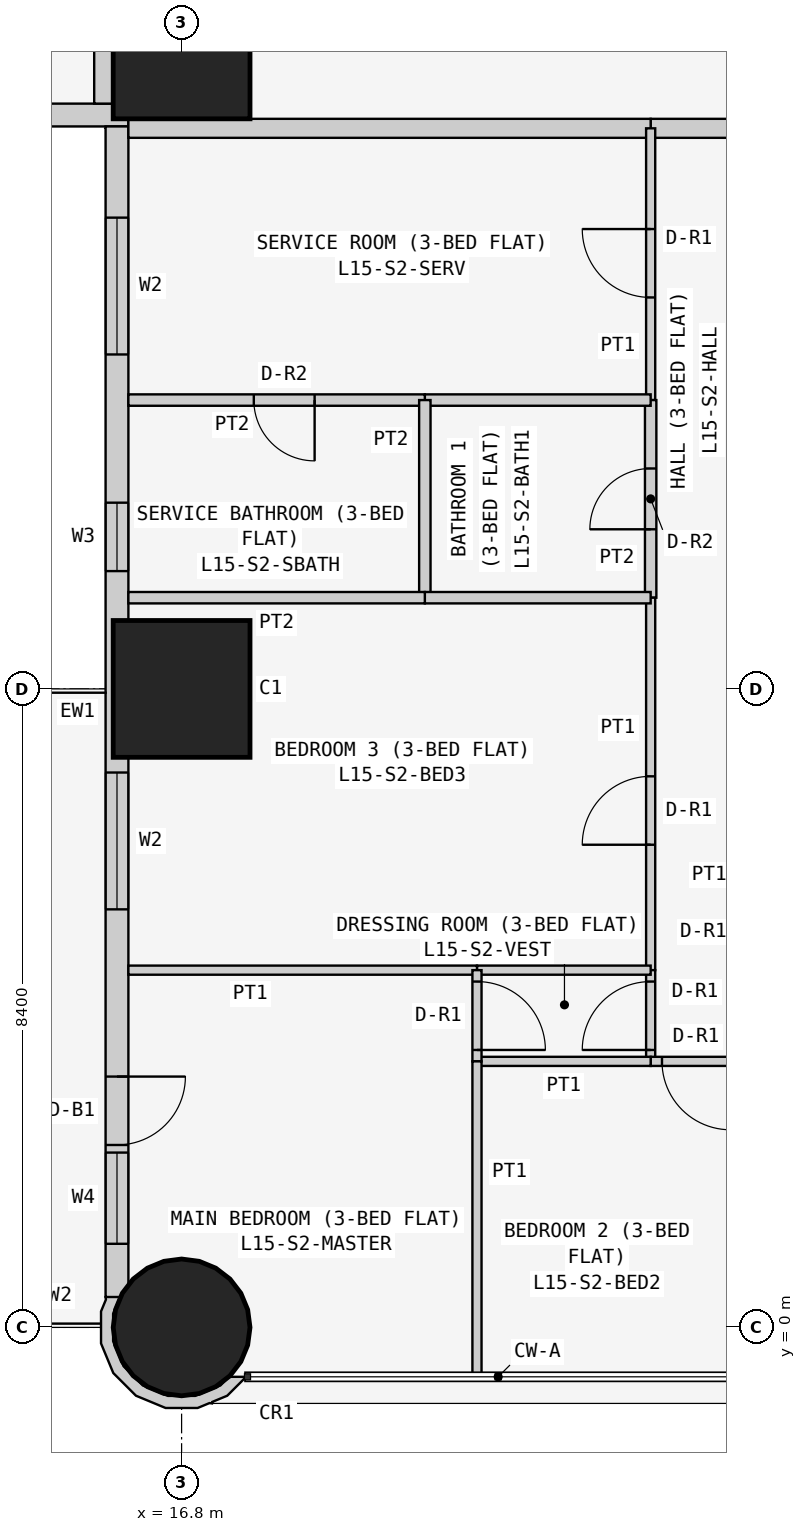
"""IFC4 building model, lengths in metres.
Left out: names, types, materials, properties, quantities, classifications, styles, units other than length and angle.
Written with IfcOpenShell. Run it as: python <this file> out.ifc"""

import sys

from ifc_helpers import new_model, si_unit, direction, frame, frame_2d, origin, origin_2d, place, context, subcontext, project, spatial, polyline, rectangle, circle, outline, extrude, element, fill, save


model = new_model("IFC4")
c1 = context("Model", 3, precision=1e-05, world=origin(), true_north=direction((0.0, 1.0)))
c2 = subcontext(c1, "Body", "Model", "MODEL_VIEW")
j1 = project(units=[si_unit("LENGTHUNIT", "METRE"), si_unit("PLANEANGLEUNIT", "RADIAN")], contexts=[c1])
p1 = place(None, origin())
s1 = spatial("IfcSite", under=j1, at=p1, CompositionType="ELEMENT")
p2 = place(p1, origin())
s2 = spatial("IfcBuilding", under=s1, at=p2, CompositionType="ELEMENT")
p3 = place(p2, frame((0.0, 0.0, 63.3)))
s3 = spatial("IfcBuildingStorey", under=s2, at=p3, CompositionType="ELEMENT", Elevation=63.3)
p4 = place(p3, frame((16.8, 0.0, 0.0), z_axis=(0.0, 0.0, 1.0), x_axis=(1.0, 0.0, 0.0)))
e1 = element("IfcColumn", 1, at=p4, inside=s3, PredefinedType="COLUMN", context=c2, shape_type="SweptSolid", body=[
    extrude(circle(Radius=0.9, at=origin_2d()), origin(), (0.0, 0.0, 1.0), 3.6),
])
for number, where, z_axis, x_axis in (
    (2, (16.8, 8.4, 0.0), (0.0, 0.0, 1.0), (1.0, 0.0, 0.0)),
    (3, (16.8, 16.8, 0.0), (0.0, 0.0, 1.0), (1.0, 0.0, 0.0)),
):
    element("IfcColumn", number, at=place(p3, frame(where, z_axis=z_axis, x_axis=x_axis)), inside=s3, PredefinedType="COLUMN", context=c2, shape_type="SweptSolid", body=[
        extrude(rectangle(XDim=1.8, YDim=1.8, at=origin_2d()), origin(), (0.0, 0.0, 1.0), 3.6),
    ])
p5 = place(p3, frame((0.4, 15.95, 0.0), z_axis=(0.0, 0.0, 1.0), x_axis=(1.0, 0.0, 0.0)))
e4 = element("IfcWall", 4, at=p5, inside=s3, PredefinedType="SOLIDWALL", context=c2, shape_type="SweptSolid", body=[
    extrude(rectangle(XDim=15.7, YDim=0.3, at=frame_2d((7.85, 0.0))), origin(), (0.0, 0.0, 1.0), 3.45),
])
p6 = place(p5, frame((12.4, 0.0, 0.9)))
e5 = element("IfcOpeningElement", 5, at=p6, cuts=e4, PredefinedType="OPENING", context=c2, shape_type="SweptSolid", body=[
    extrude(rectangle(XDim=1.8, YDim=1.5, at=frame_2d((0.9, 0.75))), frame((0.0, 0.16, 0.0), z_axis=(0.0, -1.0, 0.0), x_axis=(1.0, 0.0, 0.0)), (0.0, 0.0, 1.0), 0.32),
])
p7 = place(p5, frame((9.55, 0.0, 1.5)))
e6 = element("IfcOpeningElement", 6, at=p7, cuts=e4, PredefinedType="OPENING", context=c2, shape_type="SweptSolid", body=[
    extrude(rectangle(XDim=0.9, YDim=0.7, at=frame_2d((0.45, 0.35))), frame((0.0, 0.16, 0.0), z_axis=(0.0, -1.0, 0.0), x_axis=(1.0, 0.0, 0.0)), (0.0, 0.0, 1.0), 0.32),
])
p8 = place(p5, frame((5.1, 0.0, 0.9)))
e7 = element("IfcOpeningElement", 7, at=p8, cuts=e4, PredefinedType="OPENING", context=c2, shape_type="SweptSolid", body=[
    extrude(rectangle(XDim=1.8, YDim=1.5, at=frame_2d((0.9, 0.75))), frame((0.0, 0.16, 0.0), z_axis=(0.0, -1.0, 0.0), x_axis=(1.0, 0.0, 0.0)), (0.0, 0.0, 1.0), 0.32),
])
p9 = place(p5, frame((2.0, 0.0, 0.0)))
e8 = element("IfcOpeningElement", 8, at=p9, cuts=e4, PredefinedType="OPENING", context=c2, shape_type="SweptSolid", body=[
    extrude(rectangle(XDim=0.9, YDim=2.4, at=frame_2d((0.45, 1.2))), frame((0.0, 0.16, 0.0), z_axis=(0.0, -1.0, 0.0), x_axis=(1.0, 0.0, 0.0)), (0.0, 0.0, 1.0), 0.32),
])
p10 = place(p5, frame((0.7, 0.0, 0.9)))
e9 = element("IfcOpeningElement", 9, at=p10, cuts=e4, PredefinedType="OPENING", context=c2, shape_type="SweptSolid", body=[
    extrude(rectangle(XDim=1.2, YDim=1.5, at=frame_2d((0.6, 0.75))), frame((0.0, 0.16, 0.0), z_axis=(0.0, -1.0, 0.0), x_axis=(1.0, 0.0, 0.0)), (0.0, 0.0, 1.0), 0.32),
])
p11 = place(p3, frame((15.95, 15.8, 0.0), z_axis=(0.0, 0.0, 1.0), x_axis=(0.0, -1.0, 0.0)))
e10 = element("IfcWall", 10, at=p11, inside=s3, PredefinedType="SOLIDWALL", context=c2, shape_type="SweptSolid", body=[
    extrude(rectangle(XDim=15.4, YDim=0.3, at=frame_2d((7.7, 0.0))), origin(), (0.0, 0.0, 1.0), 3.45),
])
p12 = place(p11, frame((1.2, 0.0, 0.9)))
e11 = element("IfcOpeningElement", 11, at=p12, cuts=e10, PredefinedType="OPENING", context=c2, shape_type="SweptSolid", body=[
    extrude(rectangle(XDim=1.8, YDim=1.5, at=frame_2d((0.9, 0.75))), frame((0.0, 0.16, 0.0), z_axis=(0.0, -1.0, 0.0), x_axis=(1.0, 0.0, 0.0)), (0.0, 0.0, 1.0), 0.32),
])
p13 = place(p11, frame((4.95, 0.0, 1.5)))
e12 = element("IfcOpeningElement", 12, at=p13, cuts=e10, PredefinedType="OPENING", context=c2, shape_type="SweptSolid", body=[
    extrude(rectangle(XDim=0.9, YDim=0.7, at=frame_2d((0.45, 0.35))), frame((0.0, 0.16, 0.0), z_axis=(0.0, -1.0, 0.0), x_axis=(1.0, 0.0, 0.0)), (0.0, 0.0, 1.0), 0.32),
])
p14 = place(p11, frame((8.5, 0.0, 0.9)))
e13 = element("IfcOpeningElement", 13, at=p14, cuts=e10, PredefinedType="OPENING", context=c2, shape_type="SweptSolid", body=[
    extrude(rectangle(XDim=1.8, YDim=1.5, at=frame_2d((0.9, 0.75))), frame((0.0, 0.16, 0.0), z_axis=(0.0, -1.0, 0.0), x_axis=(1.0, 0.0, 0.0)), (0.0, 0.0, 1.0), 0.32),
])
p15 = place(p11, frame((12.5, 0.0, 0.0)))
e14 = element("IfcOpeningElement", 14, at=p15, cuts=e10, PredefinedType="OPENING", context=c2, shape_type="SweptSolid", body=[
    extrude(rectangle(XDim=0.9, YDim=2.4, at=frame_2d((0.45, 1.2))), frame((0.0, 0.16, 0.0), z_axis=(0.0, -1.0, 0.0), x_axis=(1.0, 0.0, 0.0)), (0.0, 0.0, 1.0), 0.32),
])
p16 = place(p11, frame((13.5, 0.0, 0.9)))
e15 = element("IfcOpeningElement", 15, at=p16, cuts=e10, PredefinedType="OPENING", context=c2, shape_type="SweptSolid", body=[
    extrude(rectangle(XDim=1.2, YDim=1.5, at=frame_2d((0.6, 0.75))), frame((0.0, 0.16, 0.0), z_axis=(0.0, -1.0, 0.0), x_axis=(1.0, 0.0, 0.0)), (0.0, 0.0, 1.0), 0.32),
])
p17 = place(p3, frame((15.89, 0.364, 0.0), z_axis=(0.0, 0.0, 1.0), x_axis=(-0.377204953059, -0.926129809145, 0.0)))
e16 = element("IfcWall", 16, at=p17, inside=s3, PredefinedType="SOLIDWALL", context=c2, shape_type="SweptSolid", body=[
    extrude(outline(polyline([(0.36, 1.803), (0.509, 1.741), (0.761, 1.486), (0.896, 1.154), (0.894, 0.795), (0.755, 0.465), (0.5, 0.213), (0.168, 0.078), (-0.1, 0.08), (0.001, -0.097), (0.03, -0.08), (0.199, -0.081), (0.589, 0.078), (0.889, 0.374), (1.053, 0.763), (1.055, 1.185), (0.896, 1.575), (0.778, 1.695), (0.769, 1.728), (0.75, 1.723), (0.6, 1.875), (0.295, 2.004), (0.281, 1.998), (0.36, 1.803)])), origin(), (0.0, 0.0, 1.0), 3.45),
])
p18 = place(p3, frame((24.171, 15.775, 0.0), z_axis=(0.0, 0.0, 1.0), x_axis=(-1.0, 0.0, 0.0)))
e17 = element("IfcWall", 17, at=p18, inside=s3, PredefinedType="PARTITIONING", context=c2, shape_type="SweptSolid", body=[
    extrude(rectangle(XDim=1.2, YDim=0.25, at=frame_2d((0.6, 0.0))), origin(), (0.0, 0.0, 1.0), 3.45),
])
p19 = place(p3, frame((22.971, 15.775, 0.0), z_axis=(0.0, 0.0, 1.0), x_axis=(-1.0, 0.0, 0.0)))
e18 = element("IfcWall", 18, at=p19, inside=s3, PredefinedType="PARTITIONING", context=c2, shape_type="SweptSolid", body=[
    extrude(rectangle(XDim=6.871, YDim=0.25, at=frame_2d((3.436, 0.0))), origin(), (0.0, 0.0, 1.0), 3.45),
])
p20 = place(p3, frame((15.775, 16.1, 0.0), z_axis=(0.0, 0.0, 1.0), x_axis=(0.0, 1.0, 0.0)))
e19 = element("IfcWall", 19, at=p20, inside=s3, PredefinedType="PARTITIONING", context=c2, shape_type="SweptSolid", body=[
    extrude(rectangle(XDim=6.471, YDim=0.25, at=frame_2d((3.235, 0.0))), origin(), (0.0, 0.0, 1.0), 3.45),
])
p21 = place(p3, frame((22.971, 12.2, 0.0), z_axis=(0.0, 0.0, 1.0), x_axis=(0.0, 1.0, 0.0)))
e20 = element("IfcWall", 20, at=p21, inside=s3, PredefinedType="PARTITIONING", context=c2, shape_type="SweptSolid", body=[
    extrude(rectangle(XDim=3.575, YDim=0.12, at=frame_2d((1.788, 0.0))), origin(), (0.0, 0.0, 1.0), 3.45),
])
p22 = place(p21, frame((1.35, 0.0, 0.0)))
e21 = element("IfcOpeningElement", 21, at=p22, cuts=e20, PredefinedType="OPENING", context=c2, shape_type="SweptSolid", body=[
    extrude(rectangle(XDim=0.9, YDim=2.1, at=frame_2d((0.45, 1.05))), frame((0.0, 0.07, 0.0), z_axis=(0.0, -1.0, 0.0), x_axis=(1.0, 0.0, 0.0)), (0.0, 0.0, 1.0), 0.14),
])
p23 = place(p3, frame((22.971, 9.6, 0.0), z_axis=(0.0, 0.0, 1.0), x_axis=(0.0, 1.0, 0.0)))
e22 = element("IfcWall", 22, at=p23, inside=s3, PredefinedType="PARTITIONING", context=c2, shape_type="SweptSolid", body=[
    extrude(rectangle(XDim=2.6, YDim=0.15, at=frame_2d((1.3, 0.0))), origin(), (0.0, 0.0, 1.0), 3.45),
])
p24 = place(p23, frame((0.9, 0.0, 0.0)))
e23 = element("IfcOpeningElement", 23, at=p24, cuts=e22, PredefinedType="OPENING", context=c2, shape_type="SweptSolid", body=[
    extrude(rectangle(XDim=0.8, YDim=2.1, at=frame_2d((0.4, 1.05))), frame((0.0, 0.085, 0.0), z_axis=(0.0, -1.0, 0.0), x_axis=(1.0, 0.0, 0.0)), (0.0, 0.0, 1.0), 0.17),
])
p25 = place(p3, frame((22.971, 4.7, 0.0), z_axis=(0.0, 0.0, 1.0), x_axis=(0.0, 1.0, 0.0)))
e24 = element("IfcWall", 24, at=p25, inside=s3, PredefinedType="PARTITIONING", context=c2, shape_type="SweptSolid", body=[
    extrude(rectangle(XDim=4.9, YDim=0.12, at=frame_2d((2.45, 0.0))), origin(), (0.0, 0.0, 1.0), 3.45),
])
p26 = place(p25, frame((1.65, 0.0, 0.0)))
e25 = element("IfcOpeningElement", 25, at=p26, cuts=e24, PredefinedType="OPENING", context=c2, shape_type="SweptSolid", body=[
    extrude(rectangle(XDim=0.9, YDim=2.1, at=frame_2d((0.45, 1.05))), frame((0.0, 0.07, 0.0), z_axis=(0.0, -1.0, 0.0), x_axis=(1.0, 0.0, 0.0)), (0.0, 0.0, 1.0), 0.14),
])
p27 = place(p3, frame((22.971, 3.5, 0.0), z_axis=(0.0, 0.0, 1.0), x_axis=(0.0, 1.0, 0.0)))
e26 = element("IfcWall", 26, at=p27, inside=s3, PredefinedType="PARTITIONING", context=c2, shape_type="SweptSolid", body=[
    extrude(rectangle(XDim=1.2, YDim=0.12, at=frame_2d((0.6, 0.0))), origin(), (0.0, 0.0, 1.0), 3.45),
])
p28 = place(p27, frame((0.15, 0.0, 0.0)))
e27 = element("IfcOpeningElement", 27, at=p28, cuts=e26, PredefinedType="OPENING", context=c2, shape_type="SweptSolid", body=[
    extrude(rectangle(XDim=0.9, YDim=2.1, at=frame_2d((0.45, 1.05))), frame((0.0, 0.07, 0.0), z_axis=(0.0, -1.0, 0.0), x_axis=(1.0, 0.0, 0.0)), (0.0, 0.0, 1.0), 0.14),
])
p29 = place(p3, frame((24.171, 3.5, 0.0), z_axis=(0.0, 0.0, 1.0), x_axis=(-1.0, 0.0, 0.0)))
e28 = element("IfcWall", 28, at=p29, inside=s3, PredefinedType="PARTITIONING", context=c2, shape_type="SweptSolid", body=[
    extrude(rectangle(XDim=1.2, YDim=0.12, at=frame_2d((0.6, 0.0))), origin(), (0.0, 0.0, 1.0), 3.45),
])
p30 = place(p29, frame((0.151, 0.0, 0.0)))
e29 = element("IfcOpeningElement", 29, at=p30, cuts=e28, PredefinedType="OPENING", context=c2, shape_type="SweptSolid", body=[
    extrude(rectangle(XDim=0.9, YDim=2.1, at=frame_2d((0.45, 1.05))), frame((0.0, 0.07, 0.0), z_axis=(0.0, -1.0, 0.0), x_axis=(1.0, 0.0, 0.0)), (0.0, 0.0, 1.0), 0.14),
])
p31 = place(p3, frame((22.971, 12.2, 0.0), z_axis=(0.0, 0.0, 1.0), x_axis=(-1.0, 0.0, 0.0)))
e30 = element("IfcWall", 30, at=p31, inside=s3, PredefinedType="PARTITIONING", context=c2, shape_type="SweptSolid", body=[
    extrude(rectangle(XDim=2.971, YDim=0.15, at=frame_2d((1.485, 0.0))), origin(), (0.0, 0.0, 1.0), 3.45),
])
p32 = place(p3, frame((20.0, 12.2, 0.0), z_axis=(0.0, 0.0, 1.0), x_axis=(-1.0, 0.0, 0.0)))
e31 = element("IfcWall", 31, at=p32, inside=s3, PredefinedType="PARTITIONING", context=c2, shape_type="SweptSolid", body=[
    extrude(rectangle(XDim=3.9, YDim=0.15, at=frame_2d((1.95, 0.0))), origin(), (0.0, 0.0, 1.0), 3.45),
])
p33 = place(p32, frame((1.45, 0.0, 0.0)))
e32 = element("IfcOpeningElement", 32, at=p33, cuts=e31, PredefinedType="OPENING", context=c2, shape_type="SweptSolid", body=[
    extrude(rectangle(XDim=0.8, YDim=2.1, at=frame_2d((0.4, 1.05))), frame((0.0, 0.085, 0.0), z_axis=(0.0, -1.0, 0.0), x_axis=(1.0, 0.0, 0.0)), (0.0, 0.0, 1.0), 0.17),
])
p34 = place(p3, frame((20.0, 9.6, 0.0), z_axis=(0.0, 0.0, 1.0), x_axis=(0.0, 1.0, 0.0)))
e33 = element("IfcWall", 33, at=p34, inside=s3, PredefinedType="PARTITIONING", context=c2, shape_type="SweptSolid", body=[
    extrude(rectangle(XDim=2.6, YDim=0.15, at=frame_2d((1.3, 0.0))), origin(), (0.0, 0.0, 1.0), 3.45),
])
p35 = place(p3, frame((22.971, 9.6, 0.0), z_axis=(0.0, 0.0, 1.0), x_axis=(-1.0, 0.0, 0.0)))
e34 = element("IfcWall", 34, at=p35, inside=s3, PredefinedType="PARTITIONING", context=c2, shape_type="SweptSolid", body=[
    extrude(rectangle(XDim=2.971, YDim=0.15, at=frame_2d((1.485, 0.0))), origin(), (0.0, 0.0, 1.0), 3.45),
])
p36 = place(p3, frame((20.0, 9.6, 0.0), z_axis=(0.0, 0.0, 1.0), x_axis=(-1.0, 0.0, 0.0)))
e35 = element("IfcWall", 35, at=p36, inside=s3, PredefinedType="PARTITIONING", context=c2, shape_type="SweptSolid", body=[
    extrude(rectangle(XDim=3.9, YDim=0.15, at=frame_2d((1.95, 0.0))), origin(), (0.0, 0.0, 1.0), 3.45),
])
p37 = place(p3, frame((22.971, 4.7, 0.0), z_axis=(0.0, 0.0, 1.0), x_axis=(-1.0, 0.0, 0.0)))
e36 = element("IfcWall", 36, at=p37, inside=s3, PredefinedType="PARTITIONING", context=c2, shape_type="SweptSolid", body=[
    extrude(rectangle(XDim=2.285, YDim=0.12, at=frame_2d((1.143, 0.0))), origin(), (0.0, 0.0, 1.0), 3.45),
])
p38 = place(p3, frame((20.686, 4.7, 0.0), z_axis=(0.0, 0.0, 1.0), x_axis=(-1.0, 0.0, 0.0)))
e37 = element("IfcWall", 37, at=p38, inside=s3, PredefinedType="PARTITIONING", context=c2, shape_type="SweptSolid", body=[
    extrude(rectangle(XDim=4.586, YDim=0.12, at=frame_2d((2.293, 0.0))), origin(), (0.0, 0.0, 1.0), 3.45),
])
p39 = place(p3, frame((22.971, 3.5, 0.0), z_axis=(0.0, 0.0, 1.0), x_axis=(-1.0, 0.0, 0.0)))
e38 = element("IfcWall", 38, at=p39, inside=s3, PredefinedType="PARTITIONING", context=c2, shape_type="SweptSolid", body=[
    extrude(rectangle(XDim=2.285, YDim=0.12, at=frame_2d((1.143, 0.0))), origin(), (0.0, 0.0, 1.0), 3.45),
])
p40 = place(p3, frame((20.686, 3.5, 0.0), z_axis=(0.0, 0.0, 1.0), x_axis=(0.0, 1.0, 0.0)))
e39 = element("IfcWall", 39, at=p40, inside=s3, PredefinedType="PARTITIONING", context=c2, shape_type="SweptSolid", body=[
    extrude(rectangle(XDim=1.2, YDim=0.12, at=frame_2d((0.6, 0.0))), origin(), (0.0, 0.0, 1.0), 3.45),
])
p41 = place(p40, frame((0.15, 0.0, 0.0)))
e40 = element("IfcOpeningElement", 40, at=p41, cuts=e39, PredefinedType="OPENING", context=c2, shape_type="SweptSolid", body=[
    extrude(rectangle(XDim=0.9, YDim=2.1, at=frame_2d((0.45, 1.05))), frame((0.0, 0.07, 0.0), z_axis=(0.0, -1.0, 0.0), x_axis=(1.0, 0.0, 0.0)), (0.0, 0.0, 1.0), 0.14),
])
p42 = place(p3, frame((20.686, -0.65, 0.0), z_axis=(0.0, 0.0, 1.0), x_axis=(0.0, 1.0, 0.0)))
e41 = element("IfcWall", 41, at=p42, inside=s3, PredefinedType="PARTITIONING", context=c2, shape_type="SweptSolid", body=[
    extrude(rectangle(XDim=4.15, YDim=0.12, at=frame_2d((2.075, 0.0))), origin(), (0.0, 0.0, 1.0), 3.45),
])
p43 = place(p12, origin())
e42 = element("IfcWindow", 42, at=p43, inside=s3, PartitioningType="SINGLE_PANEL", PredefinedType="WINDOW", context=c2, shape_type="SweptSolid", body=[
    extrude(rectangle(XDim=1.8, YDim=1.5, at=frame_2d((0.9, 0.75))), frame((0.0, 0.03, 0.0), z_axis=(0.0, -1.0, 0.0), x_axis=(1.0, 0.0, 0.0)), (0.0, 0.0, 1.0), 0.06),
])
fill(e11, e42)
p44 = place(p13, origin())
e43 = element("IfcWindow", 43, at=p44, inside=s3, PartitioningType="SINGLE_PANEL", PredefinedType="WINDOW", context=c2, shape_type="SweptSolid", body=[
    extrude(rectangle(XDim=0.9, YDim=0.7, at=frame_2d((0.45, 0.35))), frame((0.0, 0.03, 0.0), z_axis=(0.0, -1.0, 0.0), x_axis=(1.0, 0.0, 0.0)), (0.0, 0.0, 1.0), 0.06),
])
fill(e12, e43)
p45 = place(p14, origin())
e44 = element("IfcWindow", 44, at=p45, inside=s3, PartitioningType="SINGLE_PANEL", PredefinedType="WINDOW", context=c2, shape_type="SweptSolid", body=[
    extrude(rectangle(XDim=1.8, YDim=1.5, at=frame_2d((0.9, 0.75))), frame((0.0, 0.03, 0.0), z_axis=(0.0, -1.0, 0.0), x_axis=(1.0, 0.0, 0.0)), (0.0, 0.0, 1.0), 0.06),
])
fill(e13, e44)
p46 = place(p15, origin())
e45 = element("IfcDoor", 45, at=p46, inside=s3, OperationType="SINGLE_SWING_LEFT", PredefinedType="DOOR", context=c2, shape_type="SweptSolid", body=[
    extrude(rectangle(XDim=0.9, YDim=2.4, at=frame_2d((0.45, 1.2))), frame((0.0, 0.025, 0.0), z_axis=(0.0, -1.0, 0.0), x_axis=(1.0, 0.0, 0.0)), (0.0, 0.0, 1.0), 0.05),
])
fill(e14, e45)
p47 = place(p16, origin())
e46 = element("IfcWindow", 46, at=p47, inside=s3, PartitioningType="SINGLE_PANEL", PredefinedType="WINDOW", context=c2, shape_type="SweptSolid", body=[
    extrude(rectangle(XDim=1.2, YDim=1.5, at=frame_2d((0.6, 0.75))), frame((0.0, 0.03, 0.0), z_axis=(0.0, -1.0, 0.0), x_axis=(1.0, 0.0, 0.0)), (0.0, 0.0, 1.0), 0.06),
])
fill(e15, e46)
p48 = place(p22, origin())
e47 = element("IfcDoor", 47, at=p48, inside=s3, OperationType="SINGLE_SWING_RIGHT", PredefinedType="DOOR", context=c2, shape_type="SweptSolid", body=[
    extrude(rectangle(XDim=0.9, YDim=2.1, at=frame_2d((0.45, 1.05))), frame((0.0, 0.025, 0.0), z_axis=(0.0, -1.0, 0.0), x_axis=(1.0, 0.0, 0.0)), (0.0, 0.0, 1.0), 0.05),
])
fill(e21, e47)
p49 = place(p33, origin())
e48 = element("IfcDoor", 48, at=p49, inside=s3, OperationType="SINGLE_SWING_LEFT", PredefinedType="DOOR", context=c2, shape_type="SweptSolid", body=[
    extrude(rectangle(XDim=0.8, YDim=2.1, at=frame_2d((0.4, 1.05))), frame((0.0, 0.025, 0.0), z_axis=(0.0, -1.0, 0.0), x_axis=(1.0, 0.0, 0.0)), (0.0, 0.0, 1.0), 0.05),
])
fill(e32, e48)
p50 = place(p24, origin())
e49 = element("IfcDoor", 49, at=p50, inside=s3, OperationType="SINGLE_SWING_LEFT", PredefinedType="DOOR", context=c2, shape_type="SweptSolid", body=[
    extrude(rectangle(XDim=0.8, YDim=2.1, at=frame_2d((0.4, 1.05))), frame((0.0, 0.025, 0.0), z_axis=(0.0, -1.0, 0.0), x_axis=(1.0, 0.0, 0.0)), (0.0, 0.0, 1.0), 0.05),
])
fill(e23, e49)
p51 = place(p26, origin())
e50 = element("IfcDoor", 50, at=p51, inside=s3, OperationType="SINGLE_SWING_LEFT", PredefinedType="DOOR", context=c2, shape_type="SweptSolid", body=[
    extrude(rectangle(XDim=0.9, YDim=2.1, at=frame_2d((0.45, 1.05))), frame((0.0, 0.025, 0.0), z_axis=(0.0, -1.0, 0.0), x_axis=(1.0, 0.0, 0.0)), (0.0, 0.0, 1.0), 0.05),
])
fill(e25, e50)
p52 = place(p28, origin())
e51 = element("IfcDoor", 51, at=p52, inside=s3, OperationType="SINGLE_SWING_LEFT", PredefinedType="DOOR", context=c2, shape_type="SweptSolid", body=[
    extrude(rectangle(XDim=0.9, YDim=2.1, at=frame_2d((0.45, 1.05))), frame((0.0, 0.025, 0.0), z_axis=(0.0, -1.0, 0.0), x_axis=(1.0, 0.0, 0.0)), (0.0, 0.0, 1.0), 0.05),
])
fill(e27, e51)
p53 = place(p41, frame((0.9, 0.0, 0.0), z_axis=(0.0, 0.0, 1.0), x_axis=(-1.0, 0.0, 0.0)))
e52 = element("IfcDoor", 52, at=p53, inside=s3, OperationType="SINGLE_SWING_RIGHT", PredefinedType="DOOR", context=c2, shape_type="SweptSolid", body=[
    extrude(rectangle(XDim=0.9, YDim=2.1, at=frame_2d((0.45, 1.05))), frame((0.0, 0.025, 0.0), z_axis=(0.0, -1.0, 0.0), x_axis=(1.0, 0.0, 0.0)), (0.0, 0.0, 1.0), 0.05),
])
fill(e40, e52)
p54 = place(p30, origin())
e53 = element("IfcDoor", 53, at=p54, inside=s3, OperationType="SINGLE_SWING_LEFT", PredefinedType="DOOR", context=c2, shape_type="SweptSolid", body=[
    extrude(rectangle(XDim=0.9, YDim=2.1, at=frame_2d((0.45, 1.05))), frame((0.0, 0.025, 0.0), z_axis=(0.0, -1.0, 0.0), x_axis=(1.0, 0.0, 0.0)), (0.0, 0.0, 1.0), 0.05),
])
fill(e29, e53)
save(model, sys.argv[1])
